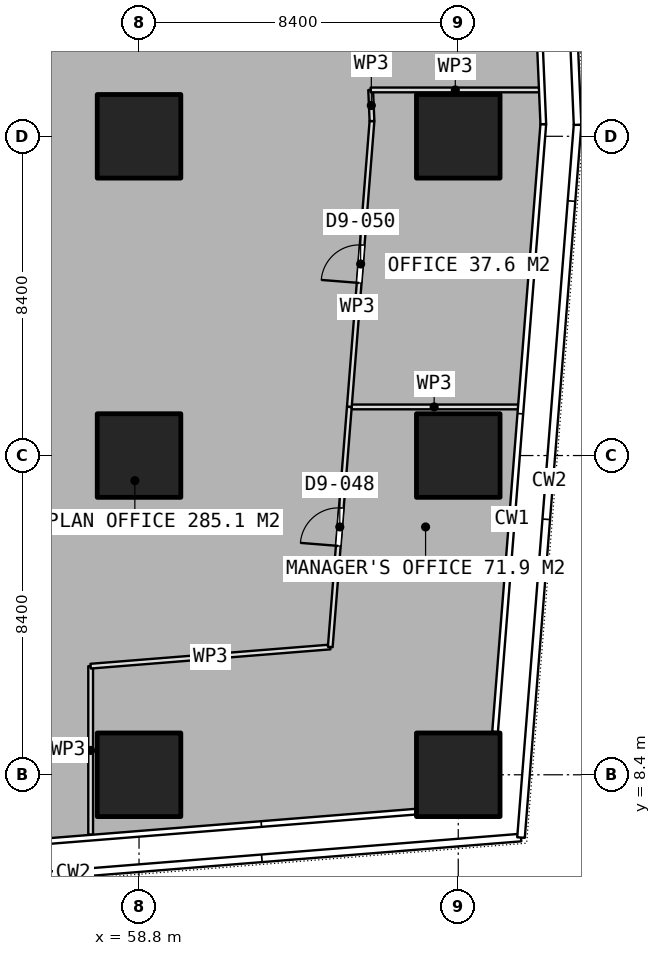
"""IFC4 building model, lengths in metres.
Left out: names, types, materials, properties, quantities, classifications, styles, units other than length and angle.
Written with IfcOpenShell. Run it as: python <this file> out.ifc"""

import sys

from ifc_helpers import new_model, si_unit, direction, frame, frame_2d, origin, origin_2d, place, context, subcontext, project, spatial, rectangle, extrude, element, fill, save


model = new_model("IFC4")
c1 = context("Model", 3, precision=1e-05, world=origin(), true_north=direction((0.0, 1.0)))
c2 = subcontext(c1, "Body", "Model", "MODEL_VIEW")
j1 = project(units=[si_unit("LENGTHUNIT", "METRE"), si_unit("PLANEANGLEUNIT", "RADIAN")], contexts=[c1])
p1 = place(None, origin())
s1 = spatial("IfcSite", under=j1, at=p1, CompositionType="ELEMENT")
p2 = place(p1, origin())
s2 = spatial("IfcBuilding", under=s1, at=p2, CompositionType="ELEMENT")
p3 = place(p2, frame((0.0, 0.0, 32.9)))
s3 = spatial("IfcBuildingStorey", under=s2, at=p3, CompositionType="ELEMENT", Elevation=32.9)
for number, where, z_axis, x_axis in (
    (1, (58.8, 8.4, 0.0), (0.0, 0.0, 1.0), (1.0, 0.0, 0.0)),
    (2, (58.8, 16.8, 0.0), (0.0, 0.0, 1.0), (1.0, 0.0, 0.0)),
    (3, (58.8, 25.2, 0.0), (0.0, 0.0, 1.0), (1.0, 0.0, 0.0)),
    (4, (67.2, 8.4, 0.0), (0.0, 0.0, 1.0), (1.0, 0.0, 0.0)),
    (5, (67.2, 16.8, 0.0), (0.0, 0.0, 1.0), (1.0, 0.0, 0.0)),
    (6, (67.2, 25.2, 0.0), (0.0, 0.0, 1.0), (1.0, 0.0, 0.0)),
):
    element("IfcColumn", number, at=place(p3, frame(where, z_axis=z_axis, x_axis=x_axis)), inside=s3, PredefinedType="COLUMN", context=c2, shape_type="SweptSolid", body=[
        extrude(rectangle(XDim=2.2, YDim=2.2, at=origin_2d()), origin(), (0.0, 0.0, 1.0), 3.75),
    ])
p4 = place(p3, frame((57.527, 6.824, 0.0), z_axis=(0.0, 0.0, 1.0), x_axis=(0.0, 1.0, 0.0)))
e7 = element("IfcWall", 7, at=p4, inside=s3, PredefinedType="PARTITIONING", context=c2, shape_type="SweptSolid", body=[
    extrude(rectangle(XDim=4.434, YDim=0.125, at=frame_2d((2.217, 0.0))), origin(), (0.0, 0.0, 1.0), 3.5),
])
p5 = place(p3, frame((57.527, 11.258, 0.0), z_axis=(0.0, 0.0, 1.0), x_axis=(0.996809139081, 0.079821928349, 0.0)))
e8 = element("IfcWall", 8, at=p5, inside=s3, PredefinedType="PARTITIONING", context=c2, shape_type="SweptSolid", body=[
    extrude(rectangle(XDim=6.325, YDim=0.125, at=frame_2d((3.163, 0.0))), origin(), (0.0, 0.0, 1.0), 3.5),
])
p6 = place(p3, frame((63.832, 11.763, 0.0), z_axis=(0.0, 0.0, 1.0), x_axis=(0.07922144789, 0.996857042005, 0.0)))
e9 = element("IfcWall", 9, at=p6, inside=s3, PredefinedType="PARTITIONING", context=c2, shape_type="SweptSolid", body=[
    extrude(rectangle(XDim=6.336, YDim=0.125, at=frame_2d((3.168, 0.0))), origin(), (0.0, 0.0, 1.0), 3.5),
])
p7 = place(p6, frame((2.668, 0.0, 0.0)))
e10 = element("IfcOpeningElement", 10, at=p7, cuts=e9, PredefinedType="OPENING", context=c2, shape_type="SweptSolid", body=[
    extrude(rectangle(XDim=1.0, YDim=2.1, at=frame_2d((0.5, 1.05))), frame((0.0, 0.073, 0.0), z_axis=(0.0, -1.0, 0.0), x_axis=(1.0, 0.0, 0.0)), (0.0, 0.0, 1.0), 0.145),
])
p8 = place(p3, frame((64.334, 18.079, 0.0), z_axis=(0.0, 0.0, 1.0), x_axis=(1.0, 0.0, 0.0)))
e11 = element("IfcWall", 11, at=p8, inside=s3, PredefinedType="PARTITIONING", context=c2, shape_type="SweptSolid", body=[
    extrude(rectangle(XDim=4.464, YDim=0.125, at=frame_2d((2.232, 0.0))), origin(), (0.0, 0.0, 1.0), 3.5),
])
p9 = place(p3, frame((64.334, 18.08, 0.0), z_axis=(0.0, 0.0, 1.0), x_axis=(0.078990223615, 0.996875390695, 0.0)))
e12 = element("IfcWall", 12, at=p9, inside=s3, PredefinedType="PARTITIONING", context=c2, shape_type="SweptSolid", body=[
    extrude(rectangle(XDim=7.545, YDim=0.125, at=frame_2d((3.772, 0.0))), origin(), (0.0, 0.0, 1.0), 3.5),
])
p10 = place(p9, frame((3.272, 0.0, 0.0)))
e13 = element("IfcOpeningElement", 13, at=p10, cuts=e12, PredefinedType="OPENING", context=c2, shape_type="SweptSolid", body=[
    extrude(rectangle(XDim=1.0, YDim=2.1, at=frame_2d((0.5, 1.05))), frame((0.0, 0.073, 0.0), z_axis=(0.0, -1.0, 0.0), x_axis=(1.0, 0.0, 0.0)), (0.0, 0.0, 1.0), 0.145),
])
p11 = place(p3, frame((64.93, 25.601, 0.0), z_axis=(0.0, 0.0, 1.0), x_axis=(-0.042596960129, 0.999092337568, 0.0)))
e14 = element("IfcWall", 14, at=p11, inside=s3, PredefinedType="PARTITIONING", context=c2, shape_type="SweptSolid", body=[
    extrude(rectangle(XDim=0.82, YDim=0.125, at=frame_2d((0.41, 0.0))), origin(), (0.0, 0.0, 1.0), 3.5),
])
p12 = place(p3, frame((64.895, 26.42, 0.0), z_axis=(0.0, 0.0, 1.0), x_axis=(1.0, 0.0, 0.0)))
e15 = element("IfcWall", 15, at=p12, inside=s3, PredefinedType="PARTITIONING", context=c2, shape_type="SweptSolid", body=[
    extrude(rectangle(XDim=4.455, YDim=0.125, at=frame_2d((2.228, 0.0))), origin(), (0.0, 0.0, 1.0), 3.5),
])
p13 = place(p7, origin())
e16 = element("IfcDoor", 16, at=p13, inside=s3, OperationType="SINGLE_SWING_LEFT", PredefinedType="DOOR", context=c2, shape_type="SweptSolid", body=[
    extrude(rectangle(XDim=1.0, YDim=2.1, at=frame_2d((0.5, 1.05))), frame((0.0, 0.025, 0.0), z_axis=(0.0, -1.0, 0.0), x_axis=(1.0, 0.0, 0.0)), (0.0, 0.0, 1.0), 0.05),
])
fill(e10, e16)
p14 = place(p10, origin())
e17 = element("IfcDoor", 17, at=p14, inside=s3, OperationType="SINGLE_SWING_LEFT", PredefinedType="DOOR", context=c2, shape_type="SweptSolid", body=[
    extrude(rectangle(XDim=1.0, YDim=2.1, at=frame_2d((0.5, 1.05))), frame((0.0, 0.025, 0.0), z_axis=(0.0, -1.0, 0.0), x_axis=(1.0, 0.0, 0.0)), (0.0, 0.0, 1.0), 0.05),
])
fill(e13, e17)
save(model, sys.argv[1])
